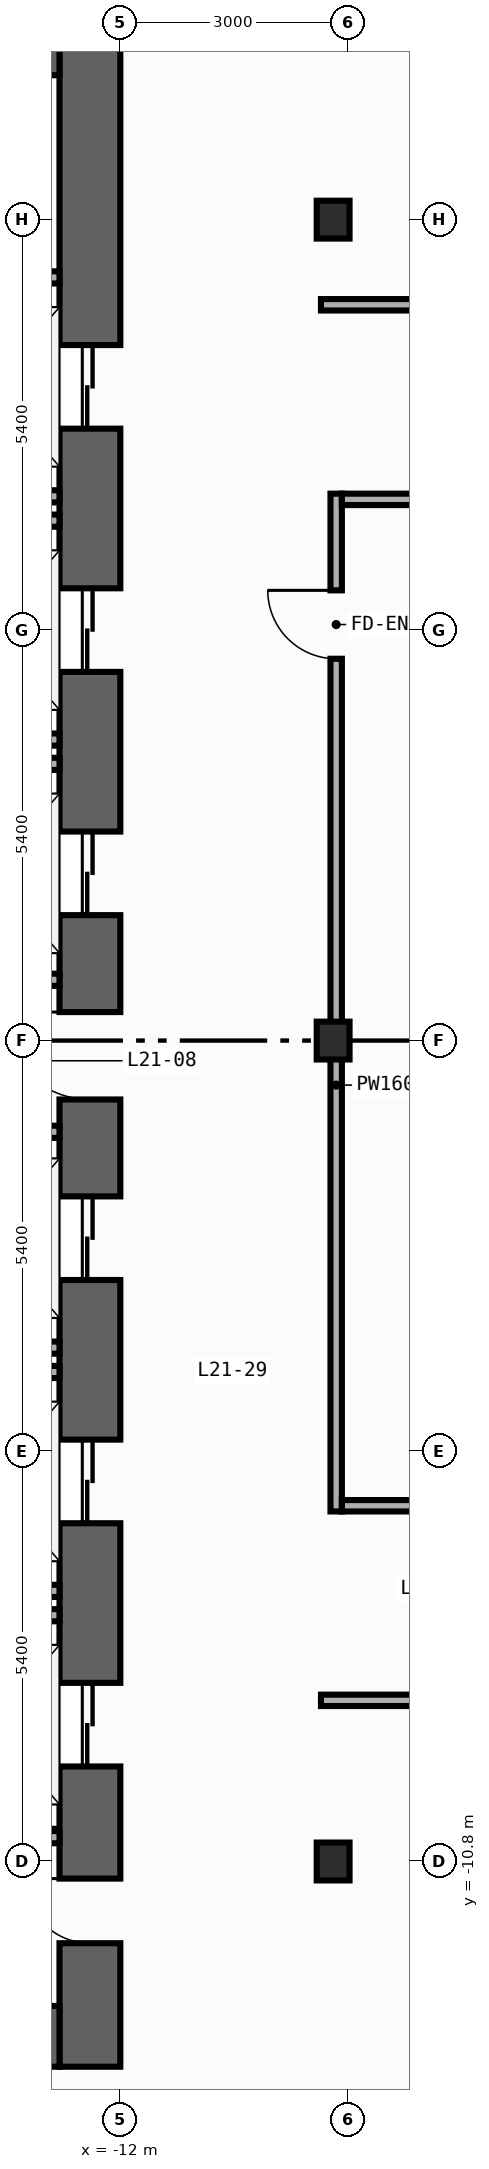
"""IFC4 building model, lengths in metres.
Left out: names, types, materials, properties, quantities, classifications, styles, units other than length and angle.
Written with IfcOpenShell. Run it as: python <this file> out.ifc"""

import sys

from ifc_helpers import new_model, si_unit, direction, frame, frame_2d, origin, origin_2d, place, context, subcontext, project, spatial, rectangle, i_section, extrude, element, fill, save


model = new_model("IFC4")
c1 = context("Model", 3, precision=1e-05, world=origin(), true_north=direction((0.0, 1.0)))
c2 = subcontext(c1, "Body", "Model", "MODEL_VIEW")
j1 = project(units=[si_unit("LENGTHUNIT", "METRE"), si_unit("PLANEANGLEUNIT", "RADIAN")], contexts=[c1])
p1 = place(None, origin())
s1 = spatial("IfcSite", under=j1, at=p1, CompositionType="ELEMENT")
p2 = place(p1, origin())
s2 = spatial("IfcBuilding", under=s1, at=p2, CompositionType="ELEMENT")
p3 = place(p2, frame((0.0, 0.0, 93.2)))
s3 = spatial("IfcBuildingStorey", under=s2, at=p3, CompositionType="ELEMENT", Elevation=93.2)
p4 = place(p3, frame((-12.4, -13.5, 0.0), z_axis=(0.0, 0.0, 1.0), x_axis=(0.0, 1.0, 0.0)))
e1 = element("IfcWall", 1, at=p4, inside=s3, PredefinedType="SHEAR", context=c2, shape_type="SweptSolid", body=[
    extrude(rectangle(XDim=27.0, YDim=0.8, at=frame_2d((13.5, 0.0))), origin(), (0.0, 0.0, 1.0), 3.94),
])
p5 = place(p4, frame((21.55, 0.0, 0.0)))
e2 = element("IfcOpeningElement", 2, at=p5, cuts=e1, PredefinedType="OPENING", context=c2, shape_type="SweptSolid", body=[
    extrude(rectangle(XDim=1.1, YDim=2.2, at=frame_2d((0.55, 1.1))), frame((0.0, 0.41, 0.0), z_axis=(0.0, -1.0, 0.0), x_axis=(1.0, 0.0, 0.0)), (0.0, 0.0, 1.0), 0.82),
])
p6 = place(p4, frame((18.35, 0.0, 0.0)))
e3 = element("IfcOpeningElement", 3, at=p6, cuts=e1, PredefinedType="OPENING", context=c2, shape_type="SweptSolid", body=[
    extrude(rectangle(XDim=1.1, YDim=2.2, at=frame_2d((0.55, 1.1))), frame((0.0, 0.41, 0.0), z_axis=(0.0, -1.0, 0.0), x_axis=(1.0, 0.0, 0.0)), (0.0, 0.0, 1.0), 0.82),
])
p7 = place(p4, frame((15.15, 0.0, 0.0)))
e4 = element("IfcOpeningElement", 4, at=p7, cuts=e1, PredefinedType="OPENING", context=c2, shape_type="SweptSolid", body=[
    extrude(rectangle(XDim=1.1, YDim=2.2, at=frame_2d((0.55, 1.1))), frame((0.0, 0.41, 0.0), z_axis=(0.0, -1.0, 0.0), x_axis=(1.0, 0.0, 0.0)), (0.0, 0.0, 1.0), 0.82),
])
p8 = place(p4, frame((10.35, 0.0, 0.0)))
e5 = element("IfcOpeningElement", 5, at=p8, cuts=e1, PredefinedType="OPENING", context=c2, shape_type="SweptSolid", body=[
    extrude(rectangle(XDim=1.1, YDim=2.2, at=frame_2d((0.55, 1.1))), frame((0.0, 0.41, 0.0), z_axis=(0.0, -1.0, 0.0), x_axis=(1.0, 0.0, 0.0)), (0.0, 0.0, 1.0), 0.82),
])
p9 = place(p4, frame((7.15, 0.0, 0.0)))
e6 = element("IfcOpeningElement", 6, at=p9, cuts=e1, PredefinedType="OPENING", context=c2, shape_type="SweptSolid", body=[
    extrude(rectangle(XDim=1.1, YDim=2.2, at=frame_2d((0.55, 1.1))), frame((0.0, 0.41, 0.0), z_axis=(0.0, -1.0, 0.0), x_axis=(1.0, 0.0, 0.0)), (0.0, 0.0, 1.0), 0.82),
])
p10 = place(p4, frame((3.95, 0.0, 0.0)))
e7 = element("IfcOpeningElement", 7, at=p10, cuts=e1, PredefinedType="OPENING", context=c2, shape_type="SweptSolid", body=[
    extrude(rectangle(XDim=1.1, YDim=2.2, at=frame_2d((0.55, 1.1))), frame((0.0, 0.41, 0.0), z_axis=(0.0, -1.0, 0.0), x_axis=(1.0, 0.0, 0.0)), (0.0, 0.0, 1.0), 0.82),
])
p11 = place(p4, frame((12.725, 0.0, 0.0)))
e8 = element("IfcOpeningElement", 8, at=p11, cuts=e1, PredefinedType="OPENING", context=c2, shape_type="SweptSolid", body=[
    extrude(rectangle(XDim=1.15, YDim=2.2, at=frame_2d((0.575, 1.1))), frame((0.0, 0.41, 0.0), z_axis=(0.0, -1.0, 0.0), x_axis=(1.0, 0.0, 0.0)), (0.0, 0.0, 1.0), 0.82),
])
p12 = place(p4, frame((1.625, 0.0, 0.0)))
e9 = element("IfcOpeningElement", 9, at=p12, cuts=e1, PredefinedType="OPENING", context=c2, shape_type="SweptSolid", body=[
    extrude(rectangle(XDim=0.85, YDim=2.1, at=frame_2d((0.425, 1.05))), frame((0.0, 0.41, 0.0), z_axis=(0.0, -1.0, 0.0), x_axis=(1.0, 0.0, 0.0)), (0.0, 0.0, 1.0), 0.82),
])
for number, where, z_axis, x_axis in (
    (10, (-19.6, -13.1, 0.0), (0.0, 0.0, 1.0), (1.0, 0.0, 0.0)),
    (11, (-19.6, 13.1, 0.0), (0.0, 0.0, 1.0), (1.0, 0.0, 0.0)),
):
    element("IfcWall", number, at=place(p3, frame(where, z_axis=z_axis, x_axis=x_axis)), inside=s3, PredefinedType="SHEAR", context=c2, shape_type="SweptSolid", body=[
        extrude(rectangle(XDim=6.8, YDim=0.8, at=frame_2d((3.4, 0.0))), origin(), (0.0, 0.0, 1.0), 3.94),
    ])
for number, where, z_axis, x_axis in (
    (12, (-9.2, -10.8, 0.0), (0.0, 0.0, 1.0), (1.0, 0.0, 0.0)),
    (13, (-9.2, 0.0, 0.0), (0.0, 0.0, 1.0), (1.0, 0.0, 0.0)),
    (14, (-9.2, 10.8, 0.0), (0.0, 0.0, 1.0), (1.0, 0.0, 0.0)),
):
    element("IfcColumn", number, at=place(p3, frame(where, z_axis=z_axis, x_axis=x_axis)), inside=s3, PredefinedType="COLUMN", context=c2, shape_type="SweptSolid", body=[
        extrude(i_section(OverallWidth=0.432, OverallDepth=0.498, WebThickness=0.045, FlangeThickness=0.07, FilletRadius=0.022, at=origin_2d()), origin(), (0.0, 0.0, 1.0), 4.2),
    ])
for number, where, z_axis, x_axis in (
    (15, (-14.99, 7.16, 0.0), (0.0, 0.0, 1.0), (1.0, 0.0, 0.0)),
    (16, (-14.99, 10.04, 0.0), (0.0, 0.0, 1.0), (1.0, 0.0, 0.0)),
    (17, (-14.99, 3.96, 0.0), (0.0, 0.0, 1.0), (1.0, 0.0, 0.0)),
    (18, (-14.99, 6.84, 0.0), (0.0, 0.0, 1.0), (1.0, 0.0, 0.0)),
    (19, (-14.99, 3.64, 0.0), (0.0, 0.0, 1.0), (1.0, 0.0, 0.0)),
    (20, (-14.99, -4.04, 0.0), (0.0, 0.0, 1.0), (1.0, 0.0, 0.0)),
    (21, (-14.99, -7.24, 0.0), (0.0, 0.0, 1.0), (1.0, 0.0, 0.0)),
    (22, (-14.99, -4.36, 0.0), (0.0, 0.0, 1.0), (1.0, 0.0, 0.0)),
    (23, (-14.99, -7.56, 0.0), (0.0, 0.0, 1.0), (1.0, 0.0, 0.0)),
):
    element("IfcWall", number, at=place(p3, frame(where, z_axis=z_axis, x_axis=x_axis)), inside=s3, PredefinedType="STANDARD", context=c2, shape_type="SweptSolid", body=[
        extrude(rectangle(XDim=2.19, YDim=0.16, at=frame_2d((1.095, 0.0))), origin(), (0.0, 0.0, 1.0), 3.94),
    ])
for number, where, z_axis, x_axis in (
    (24, (-15.4, 0.8, 0.0), (0.0, 0.0, 1.0), (1.0, 0.0, 0.0)),
    (25, (-15.4, -1.2, 0.0), (0.0, 0.0, 1.0), (1.0, 0.0, 0.0)),
    (26, (-15.4, -10.48, 0.0), (0.0, 0.0, 1.0), (1.0, 0.0, 0.0)),
):
    element("IfcWall", number, at=place(p3, frame(where, z_axis=z_axis, x_axis=x_axis)), inside=s3, PredefinedType="STANDARD", context=c2, shape_type="SweptSolid", body=[
        extrude(rectangle(XDim=2.6, YDim=0.16, at=frame_2d((1.3, 0.0))), origin(), (0.0, 0.0, 1.0), 3.94),
    ])
p13 = place(p3, frame((-9.16, -6.195, 0.0), z_axis=(0.0, 0.0, 1.0), x_axis=(0.0, 1.0, 0.0)))
e27 = element("IfcWall", 27, at=p13, inside=s3, PredefinedType="PARTITIONING", context=c2, shape_type="SweptSolid", body=[
    extrude(rectangle(XDim=13.39, YDim=0.15, at=frame_2d((6.695, 0.0))), origin(), (0.0, 0.0, 1.0), 3.24),
])
p14 = place(p13, frame((11.218, 0.0, 0.0)))
e28 = element("IfcOpeningElement", 28, at=p14, cuts=e27, PredefinedType="OPENING", context=c2, shape_type="SweptSolid", body=[
    extrude(rectangle(XDim=0.9, YDim=2.15, at=frame_2d((0.45, 1.075))), frame((0.0, 0.085, 0.0), z_axis=(0.0, -1.0, 0.0), x_axis=(1.0, 0.0, 0.0)), (0.0, 0.0, 1.0), 0.17),
])
p15 = place(p3, frame((-9.085, 7.12, 0.0), z_axis=(0.0, 0.0, 1.0), x_axis=(1.0, 0.0, 0.0)))
e29 = element("IfcWall", 29, at=p15, inside=s3, PredefinedType="PARTITIONING", context=c2, shape_type="SweptSolid", body=[
    extrude(rectangle(XDim=19.11, YDim=0.15, at=frame_2d((9.555, 0.0))), origin(), (0.0, 0.0, 1.0), 3.94),
])
p16 = place(p15, frame((8.703, 0.0, 0.0)))
e30 = element("IfcOpeningElement", 30, at=p16, cuts=e29, PredefinedType="OPENING", context=c2, shape_type="SweptSolid", body=[
    extrude(rectangle(XDim=0.9, YDim=2.15, at=frame_2d((0.45, 1.075))), frame((0.0, 0.085, 0.0), z_axis=(0.0, -1.0, 0.0), x_axis=(1.0, 0.0, 0.0)), (0.0, 0.0, 1.0), 0.17),
])
p17 = place(p3, frame((-9.36, 9.68, 0.0), z_axis=(0.0, 0.0, 1.0), x_axis=(1.0, 0.0, 0.0)))
e31 = element("IfcWall", 31, at=p17, inside=s3, PredefinedType="PARTITIONING", context=c2, shape_type="SweptSolid", body=[
    extrude(rectangle(XDim=9.34, YDim=0.15, at=frame_2d((4.67, 0.0))), origin(), (0.0, 0.0, 1.0), 3.94),
])
p18 = place(p17, frame((7.28, 0.0, 0.0)))
e32 = element("IfcOpeningElement", 32, at=p18, cuts=e31, PredefinedType="OPENING", context=c2, shape_type="SweptSolid", body=[
    extrude(rectangle(XDim=1.6, YDim=2.25, at=frame_2d((0.8, 1.125))), frame((0.0, 0.085, 0.0), z_axis=(0.0, -1.0, 0.0), x_axis=(1.0, 0.0, 0.0)), (0.0, 0.0, 1.0), 0.17),
])
p19 = place(p3, frame((-9.085, -6.12, 0.0), z_axis=(0.0, 0.0, 1.0), x_axis=(1.0, 0.0, 0.0)))
e33 = element("IfcWall", 33, at=p19, inside=s3, PredefinedType="PARTITIONING", context=c2, shape_type="SweptSolid", body=[
    extrude(rectangle(XDim=19.11, YDim=0.15, at=frame_2d((9.555, 0.0))), origin(), (0.0, 0.0, 1.0), 3.94),
])
p20 = place(p19, frame((8.703, 0.0, 0.0)))
e34 = element("IfcOpeningElement", 34, at=p20, cuts=e33, PredefinedType="OPENING", context=c2, shape_type="SweptSolid", body=[
    extrude(rectangle(XDim=0.9, YDim=2.15, at=frame_2d((0.45, 1.075))), frame((0.0, 0.085, 0.0), z_axis=(0.0, -1.0, 0.0), x_axis=(1.0, 0.0, 0.0)), (0.0, 0.0, 1.0), 0.17),
])
p21 = place(p3, frame((-9.36, -8.68, 0.0), z_axis=(0.0, 0.0, 1.0), x_axis=(1.0, 0.0, 0.0)))
e35 = element("IfcWall", 35, at=p21, inside=s3, PredefinedType="PARTITIONING", context=c2, shape_type="SweptSolid", body=[
    extrude(rectangle(XDim=15.24, YDim=0.15, at=frame_2d((7.62, 0.0))), origin(), (0.0, 0.0, 1.0), 3.94),
])
p22 = place(p21, frame((8.873, 0.0, 0.0)))
e36 = element("IfcOpeningElement", 36, at=p22, cuts=e35, PredefinedType="OPENING", context=c2, shape_type="SweptSolid", body=[
    extrude(rectangle(XDim=0.9, YDim=2.15, at=frame_2d((0.45, 1.075))), frame((0.0, 0.085, 0.0), z_axis=(0.0, -1.0, 0.0), x_axis=(1.0, 0.0, 0.0)), (0.0, 0.0, 1.0), 0.17),
])
p23 = place(p5, origin())
e37 = element("IfcDoor", 37, at=p23, inside=s3, OperationType="DOUBLE_DOOR_SLIDING", PredefinedType="DOOR", context=c2, shape_type="SweptSolid", body=[
    extrude(rectangle(XDim=1.1, YDim=2.2, at=frame_2d((0.55, 1.1))), frame((0.0, 0.025, 0.0), z_axis=(0.0, -1.0, 0.0), x_axis=(1.0, 0.0, 0.0)), (0.0, 0.0, 1.0), 0.05),
])
fill(e2, e37)
p24 = place(p6, origin())
e38 = element("IfcDoor", 38, at=p24, inside=s3, OperationType="DOUBLE_DOOR_SLIDING", PredefinedType="DOOR", context=c2, shape_type="SweptSolid", body=[
    extrude(rectangle(XDim=1.1, YDim=2.2, at=frame_2d((0.55, 1.1))), frame((0.0, 0.025, 0.0), z_axis=(0.0, -1.0, 0.0), x_axis=(1.0, 0.0, 0.0)), (0.0, 0.0, 1.0), 0.05),
])
fill(e3, e38)
p25 = place(p7, origin())
e39 = element("IfcDoor", 39, at=p25, inside=s3, OperationType="DOUBLE_DOOR_SLIDING", PredefinedType="DOOR", context=c2, shape_type="SweptSolid", body=[
    extrude(rectangle(XDim=1.1, YDim=2.2, at=frame_2d((0.55, 1.1))), frame((0.0, 0.025, 0.0), z_axis=(0.0, -1.0, 0.0), x_axis=(1.0, 0.0, 0.0)), (0.0, 0.0, 1.0), 0.05),
])
fill(e4, e39)
p26 = place(p8, origin())
e40 = element("IfcDoor", 40, at=p26, inside=s3, OperationType="DOUBLE_DOOR_SLIDING", PredefinedType="DOOR", context=c2, shape_type="SweptSolid", body=[
    extrude(rectangle(XDim=1.1, YDim=2.2, at=frame_2d((0.55, 1.1))), frame((0.0, 0.025, 0.0), z_axis=(0.0, -1.0, 0.0), x_axis=(1.0, 0.0, 0.0)), (0.0, 0.0, 1.0), 0.05),
])
fill(e5, e40)
p27 = place(p9, origin())
e41 = element("IfcDoor", 41, at=p27, inside=s3, OperationType="DOUBLE_DOOR_SLIDING", PredefinedType="DOOR", context=c2, shape_type="SweptSolid", body=[
    extrude(rectangle(XDim=1.1, YDim=2.2, at=frame_2d((0.55, 1.1))), frame((0.0, 0.025, 0.0), z_axis=(0.0, -1.0, 0.0), x_axis=(1.0, 0.0, 0.0)), (0.0, 0.0, 1.0), 0.05),
])
fill(e6, e41)
p28 = place(p10, origin())
e42 = element("IfcDoor", 42, at=p28, inside=s3, OperationType="DOUBLE_DOOR_SLIDING", PredefinedType="DOOR", context=c2, shape_type="SweptSolid", body=[
    extrude(rectangle(XDim=1.1, YDim=2.2, at=frame_2d((0.55, 1.1))), frame((0.0, 0.025, 0.0), z_axis=(0.0, -1.0, 0.0), x_axis=(1.0, 0.0, 0.0)), (0.0, 0.0, 1.0), 0.05),
])
fill(e7, e42)
p29 = place(p11, origin())
e43 = element("IfcDoor", 43, at=p29, inside=s3, OperationType="SINGLE_SWING_RIGHT", PredefinedType="DOOR", context=c2, shape_type="SweptSolid", body=[
    extrude(rectangle(XDim=1.15, YDim=2.2, at=frame_2d((0.575, 1.1))), frame((0.0, 0.025, 0.0), z_axis=(0.0, -1.0, 0.0), x_axis=(1.0, 0.0, 0.0)), (0.0, 0.0, 1.0), 0.05),
])
fill(e8, e43)
p30 = place(p12, origin())
e44 = element("IfcDoor", 44, at=p30, inside=s3, OperationType="SINGLE_SWING_RIGHT", PredefinedType="DOOR", context=c2, shape_type="SweptSolid", body=[
    extrude(rectangle(XDim=0.85, YDim=2.1, at=frame_2d((0.425, 1.05))), frame((0.0, 0.025, 0.0), z_axis=(0.0, -1.0, 0.0), x_axis=(1.0, 0.0, 0.0)), (0.0, 0.0, 1.0), 0.05),
])
fill(e9, e44)
p31 = place(p14, origin())
e45 = element("IfcDoor", 45, at=p31, inside=s3, OperationType="SINGLE_SWING_RIGHT", PredefinedType="DOOR", context=c2, shape_type="SweptSolid", body=[
    extrude(rectangle(XDim=0.9, YDim=2.15, at=frame_2d((0.45, 1.075))), frame((0.0, 0.025, 0.0), z_axis=(0.0, -1.0, 0.0), x_axis=(1.0, 0.0, 0.0)), (0.0, 0.0, 1.0), 0.05),
])
fill(e28, e45)
save(model, sys.argv[1])
